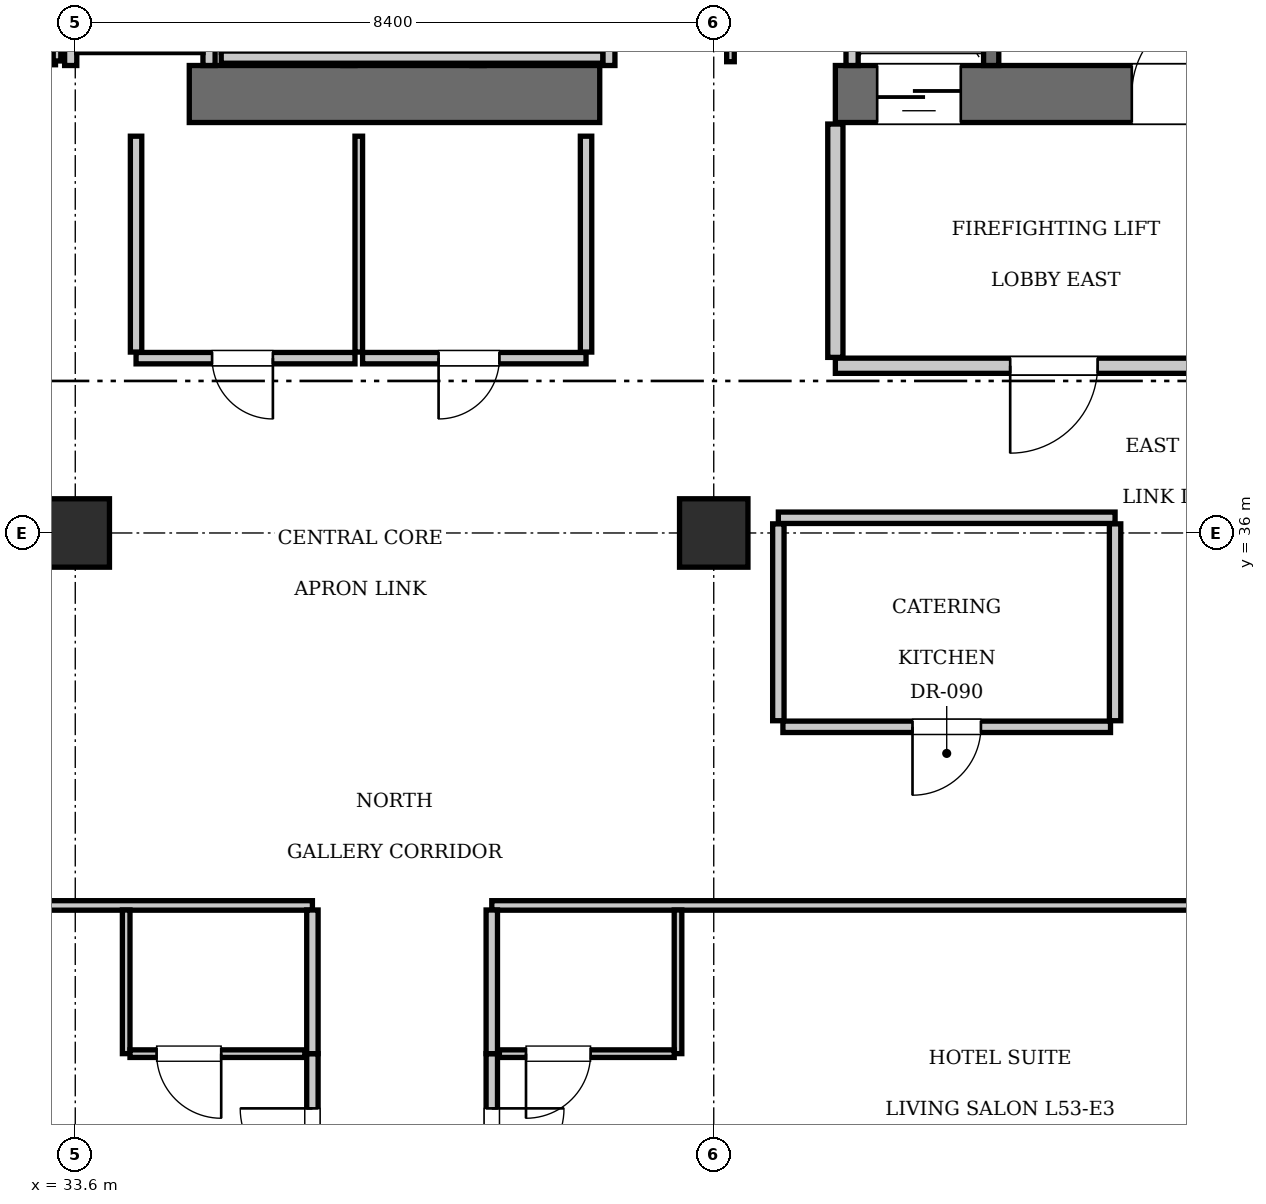
"""IFC4 building model, lengths in metres.
Left out: names, types, materials, properties, quantities, classifications, styles, units other than length and angle.
Written with IfcOpenShell. Run it as: python <this file> out.ifc"""

import sys

from ifc_helpers import new_model, si_unit, direction, frame, frame_2d, origin, origin_2d, place, context, subcontext, project, spatial, rectangle, extrude, element, fill, save


model = new_model("IFC4")
c1 = context("Model", 3, precision=1e-05, world=origin(), true_north=direction((0.0, 1.0)))
c2 = subcontext(c1, "Body", "Model", "MODEL_VIEW")
j1 = project(units=[si_unit("LENGTHUNIT", "METRE"), si_unit("PLANEANGLEUNIT", "RADIAN")], contexts=[c1])
p1 = place(None, origin())
s1 = spatial("IfcSite", under=j1, at=p1, CompositionType="ELEMENT")
p2 = place(p1, origin())
s2 = spatial("IfcBuilding", under=s1, at=p2, CompositionType="ELEMENT")
p3 = place(p2, frame((0.0, 0.0, 215.95)))
s3 = spatial("IfcBuildingStorey", under=s2, at=p3, CompositionType="ELEMENT", Elevation=215.95)
p4 = place(p3, frame((35.1, 41.775, 0.0), z_axis=(0.0, 0.0, 1.0), x_axis=(1.0, 0.0, 0.0)))
e1 = element("IfcWall", 1, at=p4, inside=s3, PredefinedType="SHEAR", context=c2, shape_type="SweptSolid", body=[
    extrude(rectangle(XDim=5.4, YDim=0.75, at=frame_2d((2.7, 0.0))), origin(), (0.0, 0.0, 1.0), 3.85),
])
p5 = place(p3, frame((43.6, 41.775, 0.0), z_axis=(0.0, 0.0, 1.0), x_axis=(1.0, 0.0, 0.0)))
e2 = element("IfcWall", 2, at=p5, inside=s3, PredefinedType="SHEAR", context=c2, shape_type="SweptSolid", body=[
    extrude(rectangle(XDim=6.8, YDim=0.75, at=frame_2d((3.4, 0.0))), origin(), (0.0, 0.0, 1.0), 3.85),
])
p6 = place(p5, frame((3.9, 0.0, 0.0)))
e3 = element("IfcOpeningElement", 3, at=p6, cuts=e2, PredefinedType="OPENING", context=c2, shape_type="SweptSolid", body=[
    extrude(rectangle(XDim=1.15, YDim=2.15, at=frame_2d((0.575, 1.075))), frame((0.0, 0.385, 0.0), z_axis=(0.0, -1.0, 0.0), x_axis=(1.0, 0.0, 0.0)), (0.0, 0.0, 1.0), 0.77),
])
p7 = place(p5, frame((0.55, 0.0, 0.0)))
e4 = element("IfcOpeningElement", 4, at=p7, cuts=e2, PredefinedType="OPENING", context=c2, shape_type="SweptSolid", body=[
    extrude(rectangle(XDim=1.1, YDim=2.2, at=frame_2d((0.55, 1.1))), frame((0.0, 0.385, 0.0), z_axis=(0.0, -1.0, 0.0), x_axis=(1.0, 0.0, 0.0)), (0.0, 0.0, 1.0), 0.77),
])
for number, where, z_axis, x_axis in (
    (5, (33.6, 36.0, 0.0), (0.0, 0.0, 1.0), (1.0, 0.0, 0.0)),
    (6, (42.0, 36.0, 0.0), (0.0, 0.0, 1.0), (1.0, 0.0, 0.0)),
):
    element("IfcColumn", number, at=place(p3, frame(where, z_axis=z_axis, x_axis=x_axis)), inside=s3, PredefinedType="COLUMN", context=c2, shape_type="SweptSolid", body=[
        extrude(rectangle(XDim=0.9, YDim=0.9, at=origin_2d()), origin(), (0.0, 0.0, 1.0), 3.85),
    ])
p8 = place(p3, frame((45.65, 42.15, 0.0), z_axis=(0.0, 0.0, 1.0), x_axis=(0.0, 1.0, 0.0)))
e7 = element("IfcWall", 7, at=p8, inside=s3, PredefinedType="SOLIDWALL", context=c2, shape_type="SweptSolid", body=[
    extrude(rectangle(XDim=9.0, YDim=0.2, at=frame_2d((4.5, 0.0))), origin(), (0.0, 0.0, 1.0), 3.61),
])
p9 = place(p3, frame((43.82, 42.15, 0.0), z_axis=(0.0, 0.0, 1.0), x_axis=(0.0, 1.0, 0.0)))
e8 = element("IfcWall", 8, at=p9, inside=s3, PredefinedType="SOLIDWALL", context=c2, shape_type="SweptSolid", body=[
    extrude(rectangle(XDim=2.59, YDim=0.16, at=frame_2d((1.295, 0.0))), origin(), (0.0, 0.0, 1.0), 3.61),
])
for number, where, z_axis, x_axis in (
    (9, (37.2, 42.15, 0.0), (0.0, 0.0, 1.0), (0.0, 1.0, 0.0)),
    (10, (38.9, 42.15, 0.0), (0.0, 0.0, 1.0), (0.0, 1.0, 0.0)),
    (11, (40.62, 42.15, 0.0), (0.0, 0.0, 1.0), (0.0, 1.0, 0.0)),
):
    element("IfcWall", number, at=place(p3, frame(where, z_axis=z_axis, x_axis=x_axis)), inside=s3, PredefinedType="SOLIDWALL", context=c2, shape_type="SweptSolid", body=[
        extrude(rectangle(XDim=2.2, YDim=0.16, at=frame_2d((1.1, 0.0))), origin(), (0.0, 0.0, 1.0), 3.61),
    ])
p10 = place(p3, frame((35.52, 42.26, 0.0), z_axis=(0.0, 0.0, 1.0), x_axis=(1.0, 0.0, 0.0)))
e12 = element("IfcWall", 12, at=p10, inside=s3, PredefinedType="SOLIDWALL", context=c2, shape_type="SweptSolid", body=[
    extrude(rectangle(XDim=5.02, YDim=0.16, at=frame_2d((2.51, 0.0))), origin(), (0.0, 0.0, 1.0), 3.61),
])
for number, where, z_axis, x_axis in (
    (13, (33.54, 42.15, 0.0), (0.0, 0.0, 1.0), (0.0, 1.0, 0.0)),
    (14, (35.36, 42.15, 0.0), (0.0, 0.0, 1.0), (0.0, 1.0, 0.0)),
):
    element("IfcWall", number, at=place(p3, frame(where, z_axis=z_axis, x_axis=x_axis)), inside=s3, PredefinedType="SOLIDWALL", context=c2, shape_type="SweptSolid", body=[
        extrude(rectangle(XDim=2.25, YDim=0.16, at=frame_2d((1.125, 0.0))), origin(), (0.0, 0.0, 1.0), 3.61),
    ])
p11 = place(p3, frame((33.62, 42.4, 0.0), z_axis=(0.0, 0.0, 1.0), x_axis=(1.0, 0.0, 0.0)))
e15 = element("IfcWall", 15, at=p11, inside=s3, PredefinedType="SOLIDWALL", context=c2, shape_type="SweptSolid", body=[
    extrude(rectangle(XDim=1.66, YDim=0.16, at=frame_2d((0.83, 0.0))), origin(), (0.0, 0.0, 1.0), 3.61),
])
p12 = place(p3, frame((43.6, 38.2, 0.0), z_axis=(0.0, 0.0, 1.0), x_axis=(1.0, 0.0, 0.0)))
e16 = element("IfcWall", 16, at=p12, inside=s3, PredefinedType="PARTITIONING", context=c2, shape_type="SweptSolid", body=[
    extrude(rectangle(XDim=5.8, YDim=0.2, at=frame_2d((2.9, 0.0))), origin(), (0.0, 0.0, 1.0), 3.61),
])
p13 = place(p12, frame((2.3, 0.0, 0.0)))
e17 = element("IfcOpeningElement", 17, at=p13, cuts=e16, PredefinedType="OPENING", context=c2, shape_type="SweptSolid", body=[
    extrude(rectangle(XDim=1.15, YDim=2.15, at=frame_2d((0.575, 1.075))), frame((0.0, 0.11, 0.0), z_axis=(0.0, -1.0, 0.0), x_axis=(1.0, 0.0, 0.0)), (0.0, 0.0, 1.0), 0.22),
])
p14 = place(p3, frame((43.6, 38.31, 0.0), z_axis=(0.0, 0.0, 1.0), x_axis=(0.0, 1.0, 0.0)))
e18 = element("IfcWall", 18, at=p14, inside=s3, PredefinedType="PARTITIONING", context=c2, shape_type="SweptSolid", body=[
    extrude(rectangle(XDim=3.07, YDim=0.2, at=frame_2d((1.535, 0.0))), origin(), (0.0, 0.0, 1.0), 3.61),
])
p15 = place(p3, frame((32.02, 42.21, 0.0), z_axis=(0.0, 0.0, 1.0), x_axis=(1.0, 0.0, 0.0)))
e19 = element("IfcWall", 19, at=p15, inside=s3, PredefinedType="PARTITIONING", context=c2, shape_type="SweptSolid", body=[
    extrude(rectangle(XDim=1.32, YDim=0.1, at=frame_2d((0.66, 0.0))), origin(), (0.0, 0.0, 1.0), 3.61),
])
p16 = place(p15, frame((0.24, 0.0, 0.0)))
e20 = element("IfcOpeningElement", 20, at=p16, cuts=e19, PredefinedType="OPENING", context=c2, shape_type="SweptSolid", body=[
    extrude(rectangle(XDim=0.8, YDim=2.05, at=frame_2d((0.4, 1.025))), frame((0.0, 0.06, 0.0), z_axis=(0.0, -1.0, 0.0), x_axis=(1.0, 0.0, 0.0)), (0.0, 0.0, 1.0), 0.12),
])
p17 = place(p3, frame((33.36, 42.21, 0.0), z_axis=(0.0, 0.0, 1.0), x_axis=(0.0, 1.0, 0.0)))
e21 = element("IfcWall", 21, at=p17, inside=s3, PredefinedType="PARTITIONING", context=c2, shape_type="SweptSolid", body=[
    extrude(rectangle(XDim=2.73, YDim=0.1, at=frame_2d((1.365, 0.0))), origin(), (0.0, 0.0, 1.0), 3.61),
])
p18 = place(p3, frame((42.22, 42.2, 0.0), z_axis=(0.0, 0.0, 1.0), x_axis=(0.0, 1.0, 0.0)))
e22 = element("IfcWall", 22, at=p18, inside=s3, PredefinedType="PARTITIONING", context=c2, shape_type="SweptSolid", body=[
    extrude(rectangle(XDim=2.76, YDim=0.1, at=frame_2d((1.38, 0.0))), origin(), (0.0, 0.0, 1.0), 3.61),
])
p19 = place(p18, frame((0.65, 0.0, 0.0)))
e23 = element("IfcOpeningElement", 23, at=p19, cuts=e22, PredefinedType="OPENING", context=c2, shape_type="SweptSolid", body=[
    extrude(rectangle(XDim=0.8, YDim=2.05, at=frame_2d((0.4, 1.025))), frame((0.0, 0.06, 0.0), z_axis=(0.0, -1.0, 0.0), x_axis=(1.0, 0.0, 0.0)), (0.0, 0.0, 1.0), 0.12),
])
p20 = place(p3, frame((34.4, 38.3, 0.0), z_axis=(0.0, 0.0, 1.0), x_axis=(1.0, 0.0, 0.0)))
e24 = element("IfcWall", 24, at=p20, inside=s3, PredefinedType="PARTITIONING", context=c2, shape_type="SweptSolid", body=[
    extrude(rectangle(XDim=2.88, YDim=0.15, at=frame_2d((1.44, 0.0))), origin(), (0.0, 0.0, 1.0), 3.61),
])
p21 = place(p20, frame((1.0, 0.0, 0.0)))
e25 = element("IfcOpeningElement", 25, at=p21, cuts=e24, PredefinedType="OPENING", context=c2, shape_type="SweptSolid", body=[
    extrude(rectangle(XDim=0.8, YDim=2.05, at=frame_2d((0.4, 1.025))), frame((0.0, 0.085, 0.0), z_axis=(0.0, -1.0, 0.0), x_axis=(1.0, 0.0, 0.0)), (0.0, 0.0, 1.0), 0.17),
])
p22 = place(p3, frame((37.38, 38.3, 0.0), z_axis=(0.0, 0.0, 1.0), x_axis=(1.0, 0.0, 0.0)))
e26 = element("IfcWall", 26, at=p22, inside=s3, PredefinedType="PARTITIONING", context=c2, shape_type="SweptSolid", body=[
    extrude(rectangle(XDim=2.94, YDim=0.15, at=frame_2d((1.47, 0.0))), origin(), (0.0, 0.0, 1.0), 3.61),
])
p23 = place(p22, frame((1.0, 0.0, 0.0)))
e27 = element("IfcOpeningElement", 27, at=p23, cuts=e26, PredefinedType="OPENING", context=c2, shape_type="SweptSolid", body=[
    extrude(rectangle(XDim=0.8, YDim=2.05, at=frame_2d((0.4, 1.025))), frame((0.0, 0.085, 0.0), z_axis=(0.0, -1.0, 0.0), x_axis=(1.0, 0.0, 0.0)), (0.0, 0.0, 1.0), 0.17),
])
p24 = place(p3, frame((34.4, 38.38, 0.0), z_axis=(0.0, 0.0, 1.0), x_axis=(0.0, 1.0, 0.0)))
e28 = element("IfcWall", 28, at=p24, inside=s3, PredefinedType="PARTITIONING", context=c2, shape_type="SweptSolid", body=[
    extrude(rectangle(XDim=2.84, YDim=0.15, at=frame_2d((1.42, 0.0))), origin(), (0.0, 0.0, 1.0), 3.61),
])
p25 = place(p3, frame((37.33, 38.38, 0.0), z_axis=(0.0, 0.0, 1.0), x_axis=(0.0, 1.0, 0.0)))
e29 = element("IfcWall", 29, at=p25, inside=s3, PredefinedType="PARTITIONING", context=c2, shape_type="SweptSolid", body=[
    extrude(rectangle(XDim=2.84, YDim=0.1, at=frame_2d((1.42, 0.0))), origin(), (0.0, 0.0, 1.0), 3.61),
])
p26 = place(p3, frame((40.32, 38.38, 0.0), z_axis=(0.0, 0.0, 1.0), x_axis=(0.0, 1.0, 0.0)))
e30 = element("IfcWall", 30, at=p26, inside=s3, PredefinedType="PARTITIONING", context=c2, shape_type="SweptSolid", body=[
    extrude(rectangle(XDim=2.84, YDim=0.15, at=frame_2d((1.42, 0.0))), origin(), (0.0, 0.0, 1.0), 3.61),
])
p27 = place(p3, frame((42.85, 36.2, 0.0), z_axis=(0.0, 0.0, 1.0), x_axis=(1.0, 0.0, 0.0)))
e31 = element("IfcWall", 31, at=p27, inside=s3, PredefinedType="PARTITIONING", context=c2, shape_type="SweptSolid", body=[
    extrude(rectangle(XDim=4.43, YDim=0.15, at=frame_2d((2.215, 0.0))), origin(), (0.0, 0.0, 1.0), 3.61),
])
for number, where, z_axis, x_axis in (
    (32, (42.85, 33.53, 0.0), (0.0, 0.0, 1.0), (0.0, 1.0, 0.0)),
    (33, (47.28, 33.53, 0.0), (0.0, 0.0, 1.0), (0.0, 1.0, 0.0)),
):
    element("IfcWall", number, at=place(p3, frame(where, z_axis=z_axis, x_axis=x_axis)), inside=s3, PredefinedType="PARTITIONING", context=c2, shape_type="SweptSolid", body=[
        extrude(rectangle(XDim=2.59, YDim=0.15, at=frame_2d((1.295, 0.0))), origin(), (0.0, 0.0, 1.0), 3.61),
    ])
p28 = place(p3, frame((42.91, 33.45, 0.0), z_axis=(0.0, 0.0, 1.0), x_axis=(1.0, 0.0, 0.0)))
e34 = element("IfcWall", 34, at=p28, inside=s3, PredefinedType="PARTITIONING", context=c2, shape_type="SweptSolid", body=[
    extrude(rectangle(XDim=4.31, YDim=0.15, at=frame_2d((2.155, 0.0))), origin(), (0.0, 0.0, 1.0), 3.61),
])
p29 = place(p28, frame((1.705, 0.0, 0.0)))
e35 = element("IfcOpeningElement", 35, at=p29, cuts=e34, PredefinedType="OPENING", context=c2, shape_type="SweptSolid", body=[
    extrude(rectangle(XDim=0.9, YDim=2.1, at=frame_2d((0.45, 1.05))), frame((0.0, 0.085, 0.0), z_axis=(0.0, -1.0, 0.0), x_axis=(1.0, 0.0, 0.0)), (0.0, 0.0, 1.0), 0.17),
])
p30 = place(p3, frame((13.2, 31.1, 0.0), z_axis=(0.0, 0.0, 1.0), x_axis=(1.0, 0.0, 0.0)))
e36 = element("IfcWall", 36, at=p30, inside=s3, PredefinedType="PARTITIONING", context=c2, shape_type="SweptSolid", body=[
    extrude(rectangle(XDim=23.52, YDim=0.125, at=frame_2d((11.76, 0.0))), origin(), (0.0, 0.0, 1.0), 3.61),
])
p31 = place(p3, frame((39.08, 31.1, 0.0), z_axis=(0.0, 0.0, 1.0), x_axis=(1.0, 0.0, 0.0)))
e37 = element("IfcWall", 37, at=p31, inside=s3, PredefinedType="PARTITIONING", context=c2, shape_type="SweptSolid", body=[
    extrude(rectangle(XDim=23.32, YDim=0.125, at=frame_2d((11.66, 0.0))), origin(), (0.0, 0.0, 1.0), 3.61),
])
p32 = place(p3, frame((36.72, 26.76, 0.0), z_axis=(0.0, 0.0, 1.0), x_axis=(0.0, 1.0, 0.0)))
e38 = element("IfcWall", 38, at=p32, inside=s3, PredefinedType="PARTITIONING", context=c2, shape_type="SweptSolid", body=[
    extrude(rectangle(XDim=2.39, YDim=0.15, at=frame_2d((1.195, 0.0))), origin(), (0.0, 0.0, 1.0), 3.61),
])
p33 = place(p32, frame((0.72, 0.0, 0.0)))
e39 = element("IfcOpeningElement", 39, at=p33, cuts=e38, PredefinedType="OPENING", context=c2, shape_type="SweptSolid", body=[
    extrude(rectangle(XDim=0.95, YDim=2.15, at=frame_2d((0.475, 1.075))), frame((0.0, 0.085, 0.0), z_axis=(0.0, -1.0, 0.0), x_axis=(1.0, 0.0, 0.0)), (0.0, 0.0, 1.0), 0.17),
])
p34 = place(p3, frame((36.72, 29.15, 0.0), z_axis=(0.0, 0.0, 1.0), x_axis=(0.0, 1.0, 0.0)))
e40 = element("IfcWall", 40, at=p34, inside=s3, PredefinedType="PARTITIONING", context=c2, shape_type="SweptSolid", body=[
    extrude(rectangle(XDim=1.89, YDim=0.15, at=frame_2d((0.945, 0.0))), origin(), (0.0, 0.0, 1.0), 3.61),
])
p35 = place(p3, frame((34.27, 29.15, 0.0), z_axis=(0.0, 0.0, 1.0), x_axis=(0.0, 1.0, 0.0)))
e41 = element("IfcWall", 41, at=p35, inside=s3, PredefinedType="PARTITIONING", context=c2, shape_type="SweptSolid", body=[
    extrude(rectangle(XDim=1.89, YDim=0.1, at=frame_2d((0.945, 0.0))), origin(), (0.0, 0.0, 1.0), 3.61),
])
p36 = place(p3, frame((34.32, 29.15, 0.0), z_axis=(0.0, 0.0, 1.0), x_axis=(1.0, 0.0, 0.0)))
e42 = element("IfcWall", 42, at=p36, inside=s3, PredefinedType="PARTITIONING", context=c2, shape_type="SweptSolid", body=[
    extrude(rectangle(XDim=2.3, YDim=0.1, at=frame_2d((1.15, 0.0))), origin(), (0.0, 0.0, 1.0), 3.61),
])
p37 = place(p36, frame((0.35, 0.0, 0.0)))
e43 = element("IfcOpeningElement", 43, at=p37, cuts=e42, PredefinedType="OPENING", context=c2, shape_type="SweptSolid", body=[
    extrude(rectangle(XDim=0.85, YDim=2.1, at=frame_2d((0.425, 1.05))), frame((0.0, 0.06, 0.0), z_axis=(0.0, -1.0, 0.0), x_axis=(1.0, 0.0, 0.0)), (0.0, 0.0, 1.0), 0.12),
])
p38 = place(p3, frame((39.08, 26.76, 0.0), z_axis=(0.0, 0.0, 1.0), x_axis=(0.0, 1.0, 0.0)))
e44 = element("IfcWall", 44, at=p38, inside=s3, PredefinedType="PARTITIONING", context=c2, shape_type="SweptSolid", body=[
    extrude(rectangle(XDim=2.39, YDim=0.15, at=frame_2d((1.195, 0.0))), origin(), (0.0, 0.0, 1.0), 3.61),
])
p39 = place(p38, frame((0.72, 0.0, 0.0)))
e45 = element("IfcOpeningElement", 45, at=p39, cuts=e44, PredefinedType="OPENING", context=c2, shape_type="SweptSolid", body=[
    extrude(rectangle(XDim=0.95, YDim=2.15, at=frame_2d((0.475, 1.075))), frame((0.0, 0.085, 0.0), z_axis=(0.0, -1.0, 0.0), x_axis=(1.0, 0.0, 0.0)), (0.0, 0.0, 1.0), 0.17),
])
p40 = place(p3, frame((39.08, 29.15, 0.0), z_axis=(0.0, 0.0, 1.0), x_axis=(0.0, 1.0, 0.0)))
e46 = element("IfcWall", 46, at=p40, inside=s3, PredefinedType="PARTITIONING", context=c2, shape_type="SweptSolid", body=[
    extrude(rectangle(XDim=1.89, YDim=0.15, at=frame_2d((0.945, 0.0))), origin(), (0.0, 0.0, 1.0), 3.61),
])
p41 = place(p3, frame((41.53, 29.15, 0.0), z_axis=(0.0, 0.0, 1.0), x_axis=(0.0, 1.0, 0.0)))
e47 = element("IfcWall", 47, at=p41, inside=s3, PredefinedType="PARTITIONING", context=c2, shape_type="SweptSolid", body=[
    extrude(rectangle(XDim=1.89, YDim=0.1, at=frame_2d((0.945, 0.0))), origin(), (0.0, 0.0, 1.0), 3.61),
])
p42 = place(p3, frame((39.18, 29.15, 0.0), z_axis=(0.0, 0.0, 1.0), x_axis=(1.0, 0.0, 0.0)))
e48 = element("IfcWall", 48, at=p42, inside=s3, PredefinedType="PARTITIONING", context=c2, shape_type="SweptSolid", body=[
    extrude(rectangle(XDim=2.3, YDim=0.1, at=frame_2d((1.15, 0.0))), origin(), (0.0, 0.0, 1.0), 3.61),
])
p43 = place(p42, frame((0.35, 0.0, 0.0)))
e49 = element("IfcOpeningElement", 49, at=p43, cuts=e48, PredefinedType="OPENING", context=c2, shape_type="SweptSolid", body=[
    extrude(rectangle(XDim=0.85, YDim=2.1, at=frame_2d((0.425, 1.05))), frame((0.0, 0.06, 0.0), z_axis=(0.0, -1.0, 0.0), x_axis=(1.0, 0.0, 0.0)), (0.0, 0.0, 1.0), 0.12),
])
p44 = place(p6, origin())
e50 = element("IfcDoor", 50, at=p44, inside=s3, OperationType="SINGLE_SWING_RIGHT", PredefinedType="DOOR", context=c2, shape_type="SweptSolid", body=[
    extrude(rectangle(XDim=1.15, YDim=2.15, at=frame_2d((0.575, 1.075))), frame((0.0, 0.025, 0.0), z_axis=(0.0, -1.0, 0.0), x_axis=(1.0, 0.0, 0.0)), (0.0, 0.0, 1.0), 0.05),
])
fill(e3, e50)
p45 = place(p7, frame((1.1, 0.0, 0.0), z_axis=(0.0, 0.0, 1.0), x_axis=(-1.0, 0.0, 0.0)))
e51 = element("IfcDoor", 51, at=p45, inside=s3, OperationType="SLIDING_TO_LEFT", PredefinedType="DOOR", context=c2, shape_type="SweptSolid", body=[
    extrude(rectangle(XDim=1.1, YDim=2.2, at=frame_2d((0.55, 1.1))), frame((0.0, 0.025, 0.0), z_axis=(0.0, -1.0, 0.0), x_axis=(1.0, 0.0, 0.0)), (0.0, 0.0, 1.0), 0.05),
])
fill(e4, e51)
p46 = place(p13, frame((1.15, 0.0, 0.0), z_axis=(0.0, 0.0, 1.0), x_axis=(-1.0, 0.0, 0.0)))
e52 = element("IfcDoor", 52, at=p46, inside=s3, OperationType="SINGLE_SWING_RIGHT", PredefinedType="DOOR", context=c2, shape_type="SweptSolid", body=[
    extrude(rectangle(XDim=1.15, YDim=2.15, at=frame_2d((0.575, 1.075))), frame((0.0, 0.025, 0.0), z_axis=(0.0, -1.0, 0.0), x_axis=(1.0, 0.0, 0.0)), (0.0, 0.0, 1.0), 0.05),
])
fill(e17, e52)
p47 = place(p21, frame((0.8, 0.0, 0.0), z_axis=(0.0, 0.0, 1.0), x_axis=(-1.0, 0.0, 0.0)))
e53 = element("IfcDoor", 53, at=p47, inside=s3, OperationType="SINGLE_SWING_LEFT", PredefinedType="DOOR", context=c2, shape_type="SweptSolid", body=[
    extrude(rectangle(XDim=0.8, YDim=2.05, at=frame_2d((0.4, 1.025))), frame((0.0, 0.025, 0.0), z_axis=(0.0, -1.0, 0.0), x_axis=(1.0, 0.0, 0.0)), (0.0, 0.0, 1.0), 0.05),
])
fill(e25, e53)
p48 = place(p23, frame((0.8, 0.0, 0.0), z_axis=(0.0, 0.0, 1.0), x_axis=(-1.0, 0.0, 0.0)))
e54 = element("IfcDoor", 54, at=p48, inside=s3, OperationType="SINGLE_SWING_RIGHT", PredefinedType="DOOR", context=c2, shape_type="SweptSolid", body=[
    extrude(rectangle(XDim=0.8, YDim=2.05, at=frame_2d((0.4, 1.025))), frame((0.0, 0.025, 0.0), z_axis=(0.0, -1.0, 0.0), x_axis=(1.0, 0.0, 0.0)), (0.0, 0.0, 1.0), 0.05),
])
fill(e27, e54)
p49 = place(p29, frame((0.9, 0.0, 0.0), z_axis=(0.0, 0.0, 1.0), x_axis=(-1.0, 0.0, 0.0)))
e55 = element("IfcDoor", 55, at=p49, inside=s3, OperationType="SINGLE_SWING_RIGHT", PredefinedType="DOOR", context=c2, shape_type="SweptSolid", body=[
    extrude(rectangle(XDim=0.9, YDim=2.1, at=frame_2d((0.45, 1.05))), frame((0.0, 0.025, 0.0), z_axis=(0.0, -1.0, 0.0), x_axis=(1.0, 0.0, 0.0)), (0.0, 0.0, 1.0), 0.05),
])
fill(e35, e55)
p50 = place(p37, frame((0.85, 0.0, 0.0), z_axis=(0.0, 0.0, 1.0), x_axis=(-1.0, 0.0, 0.0)))
e56 = element("IfcDoor", 56, at=p50, inside=s3, OperationType="SINGLE_SWING_LEFT", PredefinedType="DOOR", context=c2, shape_type="SweptSolid", body=[
    extrude(rectangle(XDim=0.85, YDim=2.1, at=frame_2d((0.425, 1.05))), frame((0.0, 0.025, 0.0), z_axis=(0.0, -1.0, 0.0), x_axis=(1.0, 0.0, 0.0)), (0.0, 0.0, 1.0), 0.05),
])
fill(e43, e56)
p51 = place(p33, origin())
e57 = element("IfcDoor", 57, at=p51, inside=s3, OperationType="SINGLE_SWING_RIGHT", PredefinedType="DOOR", context=c2, shape_type="SweptSolid", body=[
    extrude(rectangle(XDim=0.95, YDim=2.15, at=frame_2d((0.475, 1.075))), frame((0.0, 0.025, 0.0), z_axis=(0.0, -1.0, 0.0), x_axis=(1.0, 0.0, 0.0)), (0.0, 0.0, 1.0), 0.05),
])
fill(e39, e57)
p52 = place(p43, frame((0.85, 0.0, 0.0), z_axis=(0.0, 0.0, 1.0), x_axis=(-1.0, 0.0, 0.0)))
e58 = element("IfcDoor", 58, at=p52, inside=s3, OperationType="SINGLE_SWING_RIGHT", PredefinedType="DOOR", context=c2, shape_type="SweptSolid", body=[
    extrude(rectangle(XDim=0.85, YDim=2.1, at=frame_2d((0.425, 1.05))), frame((0.0, 0.025, 0.0), z_axis=(0.0, -1.0, 0.0), x_axis=(1.0, 0.0, 0.0)), (0.0, 0.0, 1.0), 0.05),
])
fill(e49, e58)
p53 = place(p39, frame((0.95, 0.0, 0.0), z_axis=(0.0, 0.0, 1.0), x_axis=(-1.0, 0.0, 0.0)))
e59 = element("IfcDoor", 59, at=p53, inside=s3, OperationType="SINGLE_SWING_LEFT", PredefinedType="DOOR", context=c2, shape_type="SweptSolid", body=[
    extrude(rectangle(XDim=0.95, YDim=2.15, at=frame_2d((0.475, 1.075))), frame((0.0, 0.025, 0.0), z_axis=(0.0, -1.0, 0.0), x_axis=(1.0, 0.0, 0.0)), (0.0, 0.0, 1.0), 0.05),
])
fill(e45, e59)
save(model, sys.argv[1])
